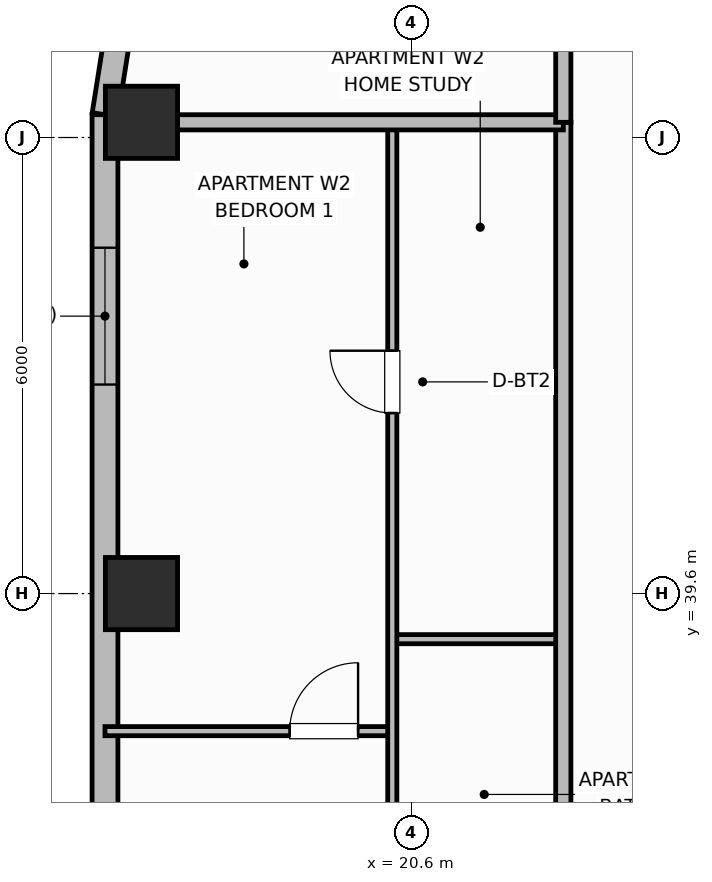
"""IFC4 building model, lengths in metres.
Left out: names, types, materials, properties, quantities, classifications, styles, units other than length and angle.
Written with IfcOpenShell. Run it as: python <this file> out.ifc"""

import sys

from ifc_helpers import new_model, si_unit, direction, frame, frame_2d, origin, origin_2d, place, context, subcontext, project, spatial, rectangle, extrude, element, fill, save


model = new_model("IFC4")
c1 = context("Model", 3, precision=1e-05, world=origin(), true_north=direction((0.0, 1.0)))
c2 = subcontext(c1, "Body", "Model", "MODEL_VIEW")
j1 = project(units=[si_unit("LENGTHUNIT", "METRE"), si_unit("PLANEANGLEUNIT", "RADIAN")], contexts=[c1])
p1 = place(None, origin())
s1 = spatial("IfcSite", under=j1, at=p1, CompositionType="ELEMENT")
p2 = place(p1, origin())
s2 = spatial("IfcBuilding", under=s1, at=p2, CompositionType="ELEMENT")
p3 = place(p2, frame((0.0, 0.0, 184.8)))
s3 = spatial("IfcBuildingStorey", under=s2, at=p3, CompositionType="ELEMENT", Elevation=184.8)
for number, where, z_axis, x_axis in (
    (1, (17.05, 39.6, 0.0), (0.0, 0.0, 1.0), (1.0, 0.0, 0.0)),
    (2, (17.05, 45.8, 0.0), (0.0, 0.0, 1.0), (1.0, 0.0, 0.0)),
):
    element("IfcColumn", number, at=place(p3, frame(where, z_axis=z_axis, x_axis=x_axis)), inside=s3, PredefinedType="COLUMN", context=c2, shape_type="SweptSolid", body=[
        extrude(rectangle(XDim=0.95, YDim=0.95, at=origin_2d()), origin(), (0.0, 0.0, 1.0), 3.7),
    ])
p4 = place(p3, frame((16.748, 47.022, 0.0), z_axis=(0.0, 0.0, 1.0), x_axis=(-0.156481329164, -0.987680916907, 0.0)))
e3 = element("IfcWall", 3, at=p4, inside=s3, PredefinedType="SOLIDWALL", context=c2, shape_type="SweptSolid", body=[
    extrude(rectangle(XDim=1.136, YDim=0.34, at=frame_2d((0.568, 0.0))), origin(), (0.0, 0.0, 1.0), 2.72),
])
p5 = place(p3, frame((16.57, 45.9, 0.0), z_axis=(0.0, 0.0, 1.0), x_axis=(0.0, -1.0, 0.0)))
e4 = element("IfcWall", 4, at=p5, inside=s3, PredefinedType="SOLIDWALL", context=c2, shape_type="SweptSolid", body=[
    extrude(rectangle(XDim=13.3, YDim=0.34, at=frame_2d((6.65, 0.0))), origin(), (0.0, 0.0, 1.0), 2.72),
])
p6 = place(p5, frame((1.75, 0.0, 0.75)))
e5 = element("IfcOpeningElement", 5, at=p6, cuts=e4, PredefinedType="OPENING", context=c2, shape_type="SweptSolid", body=[
    extrude(rectangle(XDim=1.8, YDim=1.85, at=frame_2d((0.9, 0.925))), frame((0.0, 0.18, 0.0), z_axis=(0.0, -1.0, 0.0), x_axis=(1.0, 0.0, 0.0)), (0.0, 0.0, 1.0), 0.36),
])
p7 = place(p5, frame((9.75, 0.0, 0.75)))
e6 = element("IfcOpeningElement", 6, at=p7, cuts=e4, PredefinedType="OPENING", context=c2, shape_type="SweptSolid", body=[
    extrude(rectangle(XDim=1.8, YDim=1.85, at=frame_2d((0.9, 0.925))), frame((0.0, 0.18, 0.0), z_axis=(0.0, -1.0, 0.0), x_axis=(1.0, 0.0, 0.0)), (0.0, 0.0, 1.0), 0.36),
])
p8 = place(p3, frame((20.35, 39.0, 0.0), z_axis=(0.0, 0.0, 1.0), x_axis=(1.0, 0.0, 0.0)))
e7 = element("IfcWall", 7, at=p8, inside=s3, PredefinedType="PARTITIONING", context=c2, shape_type="SweptSolid", body=[
    extrude(rectangle(XDim=2.25, YDim=0.12, at=frame_2d((1.125, 0.0))), origin(), (0.0, 0.0, 1.0), 2.55),
])
p9 = place(p3, frame((16.57, 37.79, 0.0), z_axis=(0.0, 0.0, 1.0), x_axis=(1.0, 0.0, 0.0)))
e8 = element("IfcWall", 8, at=p9, inside=s3, PredefinedType="PARTITIONING", context=c2, shape_type="SweptSolid", body=[
    extrude(rectangle(XDim=3.78, YDim=0.12, at=frame_2d((1.89, 0.0))), origin(), (0.0, 0.0, 1.0), 2.55),
])
p10 = place(p9, frame((2.43, 0.0, 0.0)))
e9 = element("IfcOpeningElement", 9, at=p10, cuts=e8, PredefinedType="OPENING", context=c2, shape_type="SweptSolid", body=[
    extrude(rectangle(XDim=0.9, YDim=2.1, at=frame_2d((0.45, 1.05))), frame((0.0, 0.07, 0.0), z_axis=(0.0, -1.0, 0.0), x_axis=(1.0, 0.0, 0.0)), (0.0, 0.0, 1.0), 0.14),
])
p11 = place(p3, frame((20.35, 29.84, 0.0), z_axis=(0.0, 0.0, 1.0), x_axis=(0.0, 1.0, 0.0)))
e10 = element("IfcWall", 10, at=p11, inside=s3, PredefinedType="PARTITIONING", context=c2, shape_type="SweptSolid", body=[
    extrude(rectangle(XDim=15.92, YDim=0.12, at=frame_2d((7.96, 0.0))), origin(), (0.0, 0.0, 1.0), 2.55),
])
p12 = place(p11, frame((0.61, 0.0, 0.0)))
e11 = element("IfcOpeningElement", 11, at=p12, cuts=e10, PredefinedType="OPENING", context=c2, shape_type="SweptSolid", body=[
    extrude(rectangle(XDim=0.9, YDim=2.1, at=frame_2d((0.45, 1.05))), frame((0.0, 0.07, 0.0), z_axis=(0.0, -1.0, 0.0), x_axis=(1.0, 0.0, 0.0)), (0.0, 0.0, 1.0), 0.14),
])
p13 = place(p11, frame((12.135, 0.0, 0.0)))
e12 = element("IfcOpeningElement", 12, at=p13, cuts=e10, PredefinedType="OPENING", context=c2, shape_type="SweptSolid", body=[
    extrude(rectangle(XDim=0.82, YDim=2.08, at=frame_2d((0.41, 1.04))), frame((0.0, 0.07, 0.0), z_axis=(0.0, -1.0, 0.0), x_axis=(1.0, 0.0, 0.0)), (0.0, 0.0, 1.0), 0.14),
])
p14 = place(p3, frame((22.6, 10.6, 0.0), z_axis=(0.0, 0.0, 1.0), x_axis=(0.0, 1.0, 0.0)))
e13 = element("IfcWall", 13, at=p14, inside=s3, PredefinedType="PARTITIONING", context=c2, shape_type="SweptSolid", body=[
    extrude(rectangle(XDim=35.2, YDim=0.2, at=frame_2d((17.6, 0.0))), origin(), (0.0, 0.0, 1.0), 2.55),
])
p15 = place(p14, frame((2.65, 0.0, 0.0)))
e14 = element("IfcOpeningElement", 14, at=p15, cuts=e13, PredefinedType="OPENING", context=c2, shape_type="SweptSolid", body=[
    extrude(rectangle(XDim=1.0, YDim=2.15, at=frame_2d((0.5, 1.075))), frame((0.0, 0.11, 0.0), z_axis=(0.0, -1.0, 0.0), x_axis=(1.0, 0.0, 0.0)), (0.0, 0.0, 1.0), 0.22),
])
p16 = place(p14, frame((22.75, 0.0, 0.0)))
e15 = element("IfcOpeningElement", 15, at=p16, cuts=e13, PredefinedType="OPENING", context=c2, shape_type="SweptSolid", body=[
    extrude(rectangle(XDim=1.0, YDim=2.15, at=frame_2d((0.5, 1.075))), frame((0.0, 0.11, 0.0), z_axis=(0.0, -1.0, 0.0), x_axis=(1.0, 0.0, 0.0)), (0.0, 0.0, 1.0), 0.22),
])
p17 = place(p3, frame((16.99, 45.8, 0.0), z_axis=(0.0, 0.0, 1.0), x_axis=(1.0, 0.0, 0.0)))
e16 = element("IfcWall", 16, at=p17, inside=s3, PredefinedType="PARTITIONING", context=c2, shape_type="SweptSolid", body=[
    extrude(rectangle(XDim=5.61, YDim=0.2, at=frame_2d((2.805, 0.0))), origin(), (0.0, 0.0, 1.0), 2.55),
])
p18 = place(p3, frame((22.6, 45.8, 0.0), z_axis=(0.0, 0.0, 1.0), x_axis=(0.0, 1.0, 0.0)))
e17 = element("IfcWall", 17, at=p18, inside=s3, PredefinedType="PARTITIONING", context=c2, shape_type="SweptSolid", body=[
    extrude(rectangle(XDim=3.73, YDim=0.2, at=frame_2d((1.865, 0.0))), origin(), (0.0, 0.0, 1.0), 2.55),
])
p19 = place(p6, origin())
e18 = element("IfcWindow", 18, at=p19, inside=s3, PartitioningType="SINGLE_PANEL", PredefinedType="WINDOW", context=c2, shape_type="SweptSolid", body=[
    extrude(rectangle(XDim=1.8, YDim=1.85, at=frame_2d((0.9, 0.925))), frame((0.0, 0.03, 0.0), z_axis=(0.0, -1.0, 0.0), x_axis=(1.0, 0.0, 0.0)), (0.0, 0.0, 1.0), 0.06),
])
fill(e5, e18)
p20 = place(p10, origin())
e19 = element("IfcDoor", 19, at=p20, inside=s3, OperationType="SINGLE_SWING_RIGHT", PredefinedType="DOOR", context=c2, shape_type="SweptSolid", body=[
    extrude(rectangle(XDim=0.9, YDim=2.1, at=frame_2d((0.45, 1.05))), frame((0.0, 0.025, 0.0), z_axis=(0.0, -1.0, 0.0), x_axis=(1.0, 0.0, 0.0)), (0.0, 0.0, 1.0), 0.05),
])
fill(e9, e19)
p21 = place(p13, origin())
e20 = element("IfcDoor", 20, at=p21, inside=s3, OperationType="SINGLE_SWING_RIGHT", PredefinedType="DOOR", context=c2, shape_type="SweptSolid", body=[
    extrude(rectangle(XDim=0.82, YDim=2.08, at=frame_2d((0.41, 1.04))), frame((0.0, 0.025, 0.0), z_axis=(0.0, -1.0, 0.0), x_axis=(1.0, 0.0, 0.0)), (0.0, 0.0, 1.0), 0.05),
])
fill(e12, e20)
save(model, sys.argv[1])
